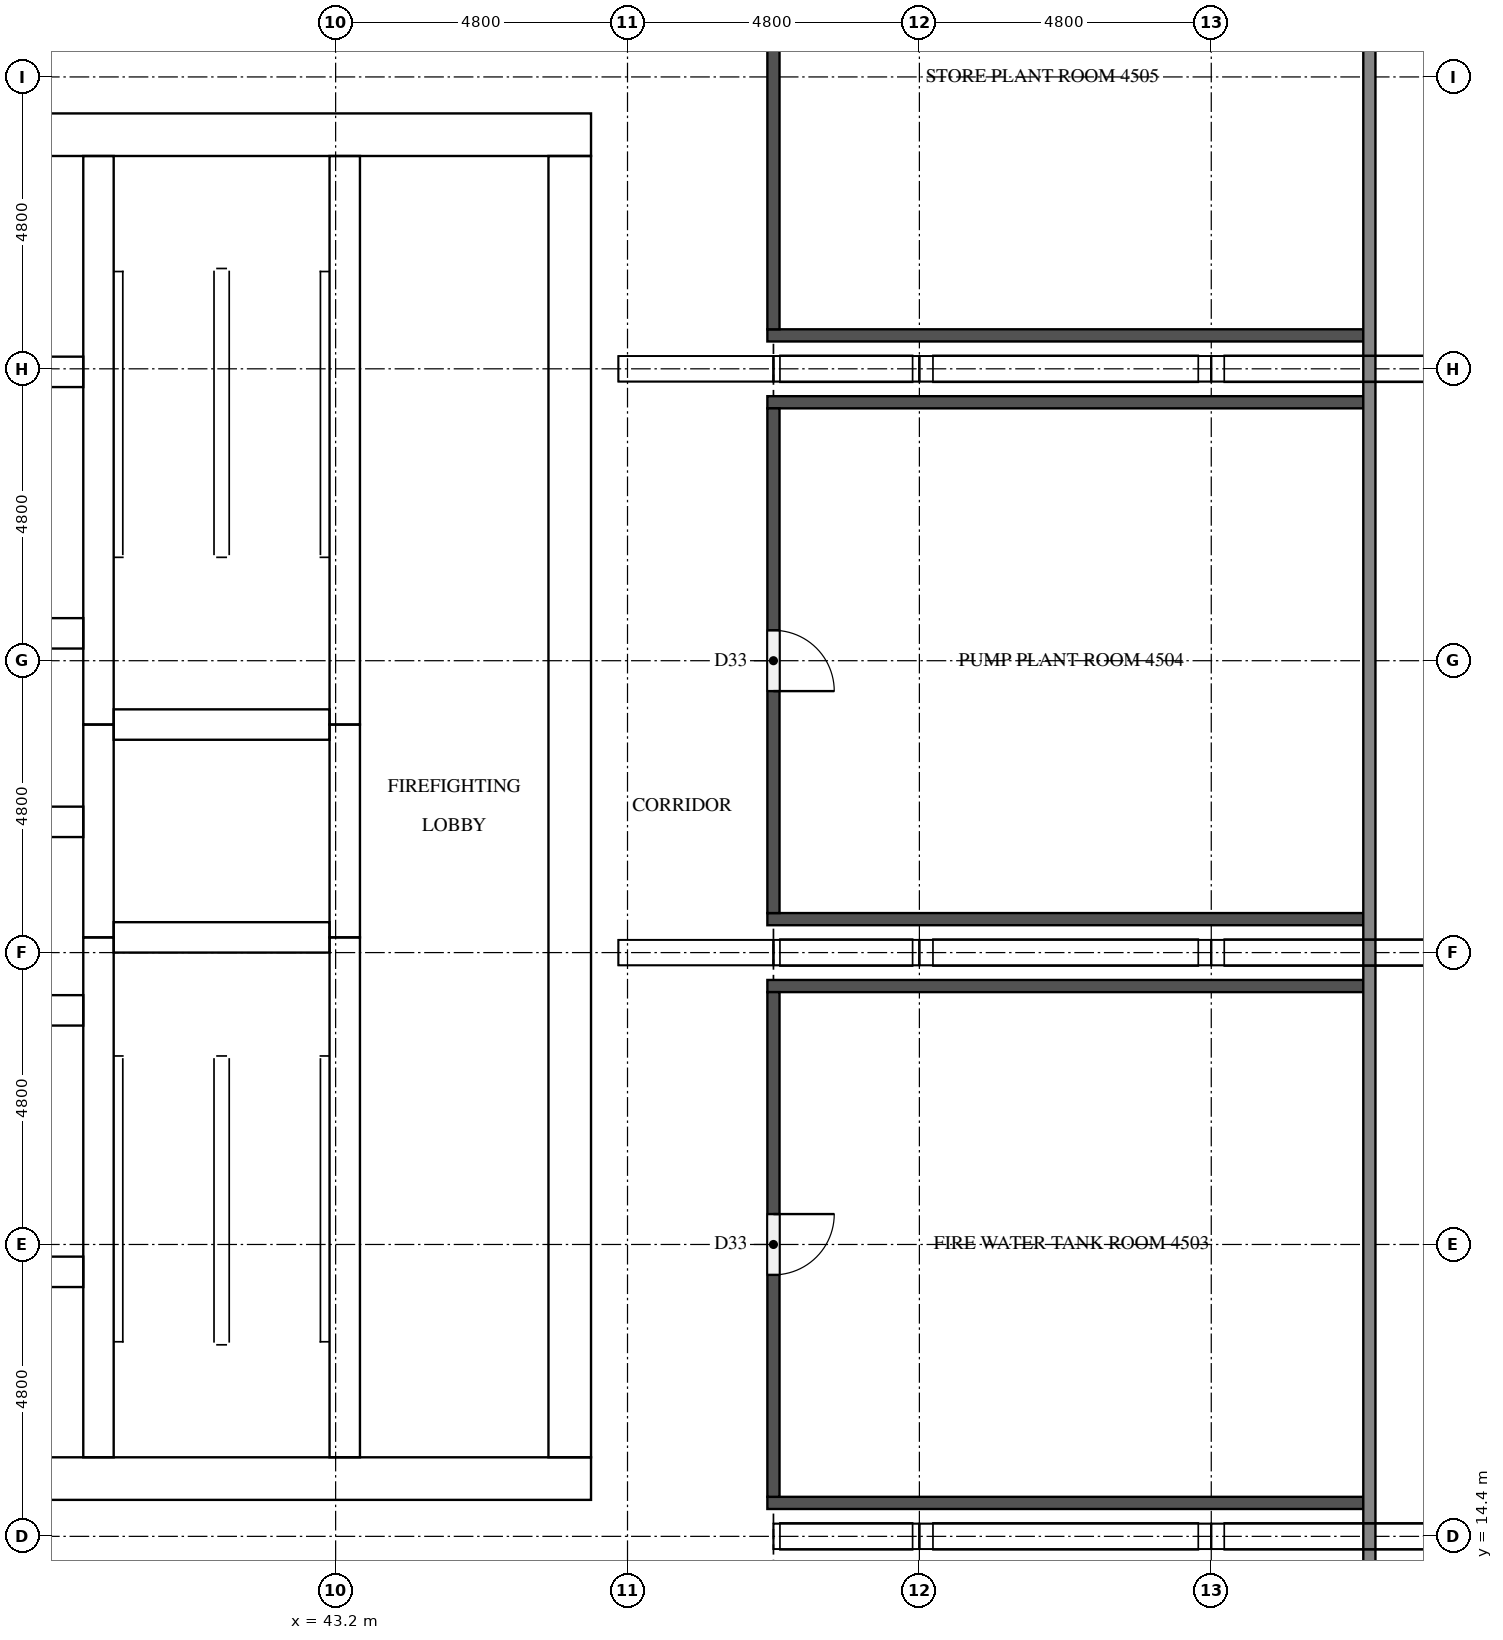
"""IFC4 building model, lengths in metres.
Left out: names, types, materials, properties, quantities, classifications, styles, units other than length and angle.
Written with IfcOpenShell. Run it as: python <this file> out.ifc"""

import sys

from ifc_helpers import new_model, si_unit, direction, frame, frame_2d, origin, place, context, subcontext, project, spatial, rectangle, extrude, element, fill, save


model = new_model("IFC4")
c1 = context("Model", 3, precision=1e-05, world=origin(), true_north=direction((0.0, 1.0)))
c2 = subcontext(c1, "Body", "Model", "MODEL_VIEW")
j1 = project(units=[si_unit("LENGTHUNIT", "METRE"), si_unit("PLANEANGLEUNIT", "RADIAN")], contexts=[c1])
p1 = place(None, origin())
s1 = spatial("IfcSite", under=j1, at=p1, CompositionType="ELEMENT")
p2 = place(p1, origin())
s2 = spatial("IfcBuilding", under=s1, at=p2, CompositionType="ELEMENT")
p3 = place(p2, frame((0.0, 0.0, 173.5)))
s3 = spatial("IfcBuildingStorey", under=s2, at=p3, CompositionType="ELEMENT", Elevation=173.5)
p4 = place(p3, frame((15.0, 15.35, 0.0), z_axis=(0.0, 0.0, 1.0), x_axis=(1.0, 0.0, 0.0)))
e1 = element("IfcWall", 1, at=p4, inside=s3, PredefinedType="SHEAR", context=c2, shape_type="SweptSolid", body=[
    extrude(rectangle(XDim=32.4, YDim=0.7, at=frame_2d((16.2, 0.0))), origin(), (0.0, 0.0, 1.0), 5.1),
])
p5 = place(p4, frame((15.3, 0.0, 0.0)))
e2 = element("IfcOpeningElement", 2, at=p5, cuts=e1, PredefinedType="OPENING", context=c2, shape_type="SweptSolid", body=[
    extrude(rectangle(XDim=1.8, YDim=2.1, at=frame_2d((0.9, 1.05))), frame((0.0, 0.36, 0.0), z_axis=(0.0, -1.0, 0.0), x_axis=(1.0, 0.0, 0.0)), (0.0, 0.0, 1.0), 0.72),
])
p6 = place(p3, frame((15.0, 37.45, 0.0), z_axis=(0.0, 0.0, 1.0), x_axis=(1.0, 0.0, 0.0)))
e3 = element("IfcWall", 3, at=p6, inside=s3, PredefinedType="SHEAR", context=c2, shape_type="SweptSolid", body=[
    extrude(rectangle(XDim=32.4, YDim=0.7, at=frame_2d((16.2, 0.0))), origin(), (0.0, 0.0, 1.0), 5.1),
])
p7 = place(p6, frame((15.3, 0.0, 0.0)))
e4 = element("IfcOpeningElement", 4, at=p7, cuts=e3, PredefinedType="OPENING", context=c2, shape_type="SweptSolid", body=[
    extrude(rectangle(XDim=1.8, YDim=2.1, at=frame_2d((0.9, 1.05))), frame((0.0, 0.36, 0.0), z_axis=(0.0, -1.0, 0.0), x_axis=(1.0, 0.0, 0.0)), (0.0, 0.0, 1.0), 0.72),
])
p8 = place(p6, frame((1.544, 0.0, 0.0)))
e5 = element("IfcOpeningElement", 5, at=p8, cuts=e3, PredefinedType="OPENING", context=c2, shape_type="SweptSolid", body=[
    extrude(rectangle(XDim=1.0, YDim=2.1, at=frame_2d((0.5, 1.05))), frame((0.0, 0.36, 0.0), z_axis=(0.0, -1.0, 0.0), x_axis=(1.0, 0.0, 0.0)), (0.0, 0.0, 1.0), 0.72),
])
p9 = place(p6, frame((5.219, 0.0, 0.0)))
e6 = element("IfcOpeningElement", 6, at=p9, cuts=e3, PredefinedType="OPENING", context=c2, shape_type="SweptSolid", body=[
    extrude(rectangle(XDim=1.0, YDim=2.1, at=frame_2d((0.5, 1.05))), frame((0.0, 0.36, 0.0), z_axis=(0.0, -1.0, 0.0), x_axis=(1.0, 0.0, 0.0)), (0.0, 0.0, 1.0), 0.72),
])
p10 = place(p3, frame((47.05, 15.7, 0.0), z_axis=(0.0, 0.0, 1.0), x_axis=(0.0, 1.0, 0.0)))
e7 = element("IfcWall", 7, at=p10, inside=s3, PredefinedType="SHEAR", context=c2, shape_type="SweptSolid", body=[
    extrude(rectangle(XDim=21.4, YDim=0.7, at=frame_2d((10.7, 0.0))), origin(), (0.0, 0.0, 1.0), 5.1),
])
p11 = place(p10, frame((10.4, 0.0, 0.0)))
e8 = element("IfcOpeningElement", 8, at=p11, cuts=e7, PredefinedType="OPENING", context=c2, shape_type="SweptSolid", body=[
    extrude(rectangle(XDim=1.2, YDim=2.1, at=frame_2d((0.6, 1.05))), frame((0.0, 0.36, 0.0), z_axis=(0.0, -1.0, 0.0), x_axis=(1.0, 0.0, 0.0)), (0.0, 0.0, 1.0), 0.72),
])
p12 = place(p3, frame((39.3, 15.7, 0.0), z_axis=(0.0, 0.0, 1.0), x_axis=(0.0, 1.0, 0.0)))
e9 = element("IfcWall", 9, at=p12, inside=s3, PredefinedType="SHEAR", context=c2, shape_type="SweptSolid", body=[
    extrude(rectangle(XDim=8.55, YDim=0.5, at=frame_2d((4.275, 0.0))), origin(), (0.0, 0.0, 1.0), 5.1),
])
p13 = place(p3, frame((39.3, 24.25, 0.0), z_axis=(0.0, 0.0, 1.0), x_axis=(0.0, 1.0, 0.0)))
e10 = element("IfcWall", 10, at=p13, inside=s3, PredefinedType="SHEAR", context=c2, shape_type="SweptSolid", body=[
    extrude(rectangle(XDim=3.5, YDim=0.5, at=frame_2d((1.75, 0.0))), origin(), (0.0, 0.0, 1.0), 5.1),
])
p14 = place(p3, frame((39.3, 27.75, 0.0), z_axis=(0.0, 0.0, 1.0), x_axis=(0.0, 1.0, 0.0)))
e11 = element("IfcWall", 11, at=p14, inside=s3, PredefinedType="SHEAR", context=c2, shape_type="SweptSolid", body=[
    extrude(rectangle(XDim=9.35, YDim=0.5, at=frame_2d((4.675, 0.0))), origin(), (0.0, 0.0, 1.0), 5.1),
])
p15 = place(p3, frame((43.35, 15.7, 0.0), z_axis=(0.0, 0.0, 1.0), x_axis=(0.0, 1.0, 0.0)))
e12 = element("IfcWall", 12, at=p15, inside=s3, PredefinedType="SHEAR", context=c2, shape_type="SweptSolid", body=[
    extrude(rectangle(XDim=8.55, YDim=0.5, at=frame_2d((4.275, 0.0))), origin(), (0.0, 0.0, 1.0), 5.1),
])
p16 = place(p15, frame((0.5, 0.0, 0.0)))
e13 = element("IfcOpeningElement", 13, at=p16, cuts=e12, PredefinedType="OPENING", context=c2, shape_type="SweptSolid", body=[
    extrude(rectangle(XDim=1.2, YDim=2.1, at=frame_2d((0.6, 1.05))), frame((0.0, 0.26, 0.0), z_axis=(0.0, -1.0, 0.0), x_axis=(1.0, 0.0, 0.0)), (0.0, 0.0, 1.0), 0.52),
])
p17 = place(p3, frame((43.35, 24.25, 0.0), z_axis=(0.0, 0.0, 1.0), x_axis=(0.0, 1.0, 0.0)))
e14 = element("IfcWall", 14, at=p17, inside=s3, PredefinedType="SHEAR", context=c2, shape_type="SweptSolid", body=[
    extrude(rectangle(XDim=3.5, YDim=0.5, at=frame_2d((1.75, 0.0))), origin(), (0.0, 0.0, 1.0), 5.1),
])
p18 = place(p17, frame((1.2, 0.0, 0.0)))
e15 = element("IfcOpeningElement", 15, at=p18, cuts=e14, PredefinedType="OPENING", context=c2, shape_type="SweptSolid", body=[
    extrude(rectangle(XDim=1.1, YDim=2.1, at=frame_2d((0.55, 1.05))), frame((0.0, 0.26, 0.0), z_axis=(0.0, -1.0, 0.0), x_axis=(1.0, 0.0, 0.0)), (0.0, 0.0, 1.0), 0.52),
])
p19 = place(p3, frame((43.35, 27.75, 0.0), z_axis=(0.0, 0.0, 1.0), x_axis=(0.0, 1.0, 0.0)))
e16 = element("IfcWall", 16, at=p19, inside=s3, PredefinedType="SHEAR", context=c2, shape_type="SweptSolid", body=[
    extrude(rectangle(XDim=9.35, YDim=0.5, at=frame_2d((4.675, 0.0))), origin(), (0.0, 0.0, 1.0), 5.1),
])
p20 = place(p19, frame((7.65, 0.0, 0.0)))
e17 = element("IfcOpeningElement", 17, at=p20, cuts=e16, PredefinedType="OPENING", context=c2, shape_type="SweptSolid", body=[
    extrude(rectangle(XDim=1.2, YDim=2.1, at=frame_2d((0.6, 1.05))), frame((0.0, 0.26, 0.0), z_axis=(0.0, -1.0, 0.0), x_axis=(1.0, 0.0, 0.0)), (0.0, 0.0, 1.0), 0.52),
])
for number, where, z_axis, x_axis in (
    (18, (39.55, 24.25, 0.0), (0.0, 0.0, 1.0), (1.0, 0.0, 0.0)),
    (19, (39.55, 27.75, 0.0), (0.0, 0.0, 1.0), (1.0, 0.0, 0.0)),
):
    element("IfcWall", number, at=place(p3, frame(where, z_axis=z_axis, x_axis=x_axis)), inside=s3, PredefinedType="SHEAR", context=c2, shape_type="SweptSolid", body=[
        extrude(rectangle(XDim=3.55, YDim=0.5, at=frame_2d((1.775, 0.0))), origin(), (0.0, 0.0, 1.0), 5.1),
    ])
p21 = place(p3, frame((33.45, 18.75, 0.0), z_axis=(0.0, 0.0, 1.0), x_axis=(1.0, 0.0, 0.0)))
e20 = element("IfcWall", 20, at=p21, inside=s3, PredefinedType="SHEAR", context=c2, shape_type="SweptSolid", body=[
    extrude(rectangle(XDim=5.6, YDim=0.5, at=frame_2d((2.8, 0.0))), origin(), (0.0, 0.0, 1.0), 5.1),
])
p22 = place(p21, frame((2.55, 0.0, 0.0)))
e21 = element("IfcOpeningElement", 21, at=p22, cuts=e20, PredefinedType="OPENING", context=c2, shape_type="SweptSolid", body=[
    extrude(rectangle(XDim=1.0, YDim=2.1, at=frame_2d((0.5, 1.05))), frame((0.0, 0.26, 0.0), z_axis=(0.0, -1.0, 0.0), x_axis=(1.0, 0.0, 0.0)), (0.0, 0.0, 1.0), 0.52),
])
p23 = place(p3, frame((23.35, 23.05, 0.0), z_axis=(0.0, 0.0, 1.0), x_axis=(1.0, 0.0, 0.0)))
e22 = element("IfcWall", 22, at=p23, inside=s3, PredefinedType="SHEAR", context=c2, shape_type="SweptSolid", body=[
    extrude(rectangle(XDim=15.7, YDim=0.5, at=frame_2d((7.85, 0.0))), origin(), (0.0, 0.0, 1.0), 5.1),
])
p24 = place(p23, frame((2.05, 0.0, 0.0)))
e23 = element("IfcOpeningElement", 23, at=p24, cuts=e22, PredefinedType="OPENING", context=c2, shape_type="SweptSolid", body=[
    extrude(rectangle(XDim=1.0, YDim=2.1, at=frame_2d((0.5, 1.05))), frame((0.0, 0.26, 0.0), z_axis=(0.0, -1.0, 0.0), x_axis=(1.0, 0.0, 0.0)), (0.0, 0.0, 1.0), 0.52),
])
p25 = place(p23, frame((12.65, 0.0, 0.0)))
e24 = element("IfcOpeningElement", 24, at=p25, cuts=e22, PredefinedType="OPENING", context=c2, shape_type="SweptSolid", body=[
    extrude(rectangle(XDim=1.0, YDim=2.1, at=frame_2d((0.5, 1.05))), frame((0.0, 0.26, 0.0), z_axis=(0.0, -1.0, 0.0), x_axis=(1.0, 0.0, 0.0)), (0.0, 0.0, 1.0), 0.52),
])
p26 = place(p3, frame((23.35, 26.15, 0.0), z_axis=(0.0, 0.0, 1.0), x_axis=(1.0, 0.0, 0.0)))
e25 = element("IfcWall", 25, at=p26, inside=s3, PredefinedType="SHEAR", context=c2, shape_type="SweptSolid", body=[
    extrude(rectangle(XDim=15.7, YDim=0.5, at=frame_2d((7.85, 0.0))), origin(), (0.0, 0.0, 1.0), 5.1),
])
p27 = place(p3, frame((23.35, 29.25, 0.0), z_axis=(0.0, 0.0, 1.0), x_axis=(1.0, 0.0, 0.0)))
e26 = element("IfcWall", 26, at=p27, inside=s3, PredefinedType="SHEAR", context=c2, shape_type="SweptSolid", body=[
    extrude(rectangle(XDim=15.7, YDim=0.5, at=frame_2d((7.85, 0.0))), origin(), (0.0, 0.0, 1.0), 5.1),
])
p28 = place(p27, frame((0.675, 0.0, 0.0)))
e27 = element("IfcOpeningElement", 27, at=p28, cuts=e26, PredefinedType="OPENING", context=c2, shape_type="SweptSolid", body=[
    extrude(rectangle(XDim=1.1, YDim=2.1, at=frame_2d((0.55, 1.05))), frame((0.0, 0.26, 0.0), z_axis=(0.0, -1.0, 0.0), x_axis=(1.0, 0.0, 0.0)), (0.0, 0.0, 1.0), 0.52),
])
p29 = place(p27, frame((3.325, 0.0, 0.0)))
e28 = element("IfcOpeningElement", 28, at=p29, cuts=e26, PredefinedType="OPENING", context=c2, shape_type="SweptSolid", body=[
    extrude(rectangle(XDim=1.1, YDim=2.1, at=frame_2d((0.55, 1.05))), frame((0.0, 0.26, 0.0), z_axis=(0.0, -1.0, 0.0), x_axis=(1.0, 0.0, 0.0)), (0.0, 0.0, 1.0), 0.52),
])
p30 = place(p27, frame((5.975, 0.0, 0.0)))
e29 = element("IfcOpeningElement", 29, at=p30, cuts=e26, PredefinedType="OPENING", context=c2, shape_type="SweptSolid", body=[
    extrude(rectangle(XDim=1.1, YDim=2.1, at=frame_2d((0.55, 1.05))), frame((0.0, 0.26, 0.0), z_axis=(0.0, -1.0, 0.0), x_axis=(1.0, 0.0, 0.0)), (0.0, 0.0, 1.0), 0.52),
])
p31 = place(p27, frame((8.625, 0.0, 0.0)))
e30 = element("IfcOpeningElement", 30, at=p31, cuts=e26, PredefinedType="OPENING", context=c2, shape_type="SweptSolid", body=[
    extrude(rectangle(XDim=1.1, YDim=2.1, at=frame_2d((0.55, 1.05))), frame((0.0, 0.26, 0.0), z_axis=(0.0, -1.0, 0.0), x_axis=(1.0, 0.0, 0.0)), (0.0, 0.0, 1.0), 0.52),
])
p32 = place(p27, frame((11.275, 0.0, 0.0)))
e31 = element("IfcOpeningElement", 31, at=p32, cuts=e26, PredefinedType="OPENING", context=c2, shape_type="SweptSolid", body=[
    extrude(rectangle(XDim=1.1, YDim=2.1, at=frame_2d((0.55, 1.05))), frame((0.0, 0.26, 0.0), z_axis=(0.0, -1.0, 0.0), x_axis=(1.0, 0.0, 0.0)), (0.0, 0.0, 1.0), 0.52),
])
p33 = place(p27, frame((13.925, 0.0, 0.0)))
e32 = element("IfcOpeningElement", 32, at=p33, cuts=e26, PredefinedType="OPENING", context=c2, shape_type="SweptSolid", body=[
    extrude(rectangle(XDim=1.1, YDim=2.1, at=frame_2d((0.55, 1.05))), frame((0.0, 0.26, 0.0), z_axis=(0.0, -1.0, 0.0), x_axis=(1.0, 0.0, 0.0)), (0.0, 0.0, 1.0), 0.52),
])
p34 = place(p3, frame((33.45, 33.55, 0.0), z_axis=(0.0, 0.0, 1.0), x_axis=(1.0, 0.0, 0.0)))
e33 = element("IfcWall", 33, at=p34, inside=s3, PredefinedType="SHEAR", context=c2, shape_type="SweptSolid", body=[
    extrude(rectangle(XDim=5.6, YDim=0.5, at=frame_2d((2.8, 0.0))), origin(), (0.0, 0.0, 1.0), 5.1),
])
p35 = place(p34, frame((2.55, 0.0, 0.0)))
e34 = element("IfcOpeningElement", 34, at=p35, cuts=e33, PredefinedType="OPENING", context=c2, shape_type="SweptSolid", body=[
    extrude(rectangle(XDim=1.0, YDim=2.1, at=frame_2d((0.5, 1.05))), frame((0.0, 0.26, 0.0), z_axis=(0.0, -1.0, 0.0), x_axis=(1.0, 0.0, 0.0)), (0.0, 0.0, 1.0), 0.52),
])
for number, where, z_axis, x_axis in (
    (35, (50.3, 14.95, 0.0), (0.0, 0.0, 1.0), (1.0, 0.0, 0.0)),
    (36, (50.3, 23.45, 0.0), (0.0, 0.0, 1.0), (1.0, 0.0, 0.0)),
    (37, (50.3, 24.55, 0.0), (0.0, 0.0, 1.0), (1.0, 0.0, 0.0)),
    (38, (50.3, 33.05, 0.0), (0.0, 0.0, 1.0), (1.0, 0.0, 0.0)),
    (39, (50.3, 34.15, 0.0), (0.0, 0.0, 1.0), (1.0, 0.0, 0.0)),
):
    element("IfcWall", number, at=place(p3, frame(where, z_axis=z_axis, x_axis=x_axis)), inside=s3, PredefinedType="PARTITIONING", context=c2, shape_type="SweptSolid", body=[
        extrude(rectangle(XDim=9.8, YDim=0.2, at=frame_2d((4.9, 0.0))), origin(), (0.0, 0.0, 1.0), 5.1),
    ])
p36 = place(p3, frame((50.4, 23.35, 0.0), z_axis=(0.0, 0.0, 1.0), x_axis=(0.0, -1.0, 0.0)))
e40 = element("IfcWall", 40, at=p36, inside=s3, PredefinedType="PARTITIONING", context=c2, shape_type="SweptSolid", body=[
    extrude(rectangle(XDim=8.3, YDim=0.2, at=frame_2d((4.15, 0.0))), origin(), (0.0, 0.0, 1.0), 5.1),
])
p37 = place(p36, frame((3.65, 0.0, 0.0)))
e41 = element("IfcOpeningElement", 41, at=p37, cuts=e40, PredefinedType="OPENING", context=c2, shape_type="SweptSolid", body=[
    extrude(rectangle(XDim=1.0, YDim=2.1, at=frame_2d((0.5, 1.05))), frame((0.0, 0.11, 0.0), z_axis=(0.0, -1.0, 0.0), x_axis=(1.0, 0.0, 0.0)), (0.0, 0.0, 1.0), 0.22),
])
p38 = place(p3, frame((50.4, 32.95, 0.0), z_axis=(0.0, 0.0, 1.0), x_axis=(0.0, -1.0, 0.0)))
e42 = element("IfcWall", 42, at=p38, inside=s3, PredefinedType="PARTITIONING", context=c2, shape_type="SweptSolid", body=[
    extrude(rectangle(XDim=8.3, YDim=0.2, at=frame_2d((4.15, 0.0))), origin(), (0.0, 0.0, 1.0), 5.1),
])
p39 = place(p38, frame((3.65, 0.0, 0.0)))
e43 = element("IfcOpeningElement", 43, at=p39, cuts=e42, PredefinedType="OPENING", context=c2, shape_type="SweptSolid", body=[
    extrude(rectangle(XDim=1.0, YDim=2.1, at=frame_2d((0.5, 1.05))), frame((0.0, 0.11, 0.0), z_axis=(0.0, -1.0, 0.0), x_axis=(1.0, 0.0, 0.0)), (0.0, 0.0, 1.0), 0.22),
])
p40 = place(p3, frame((50.4, 34.25, 0.0), z_axis=(0.0, 0.0, 1.0), x_axis=(0.0, 1.0, 0.0)))
e44 = element("IfcWall", 44, at=p40, inside=s3, PredefinedType="PARTITIONING", context=c2, shape_type="SweptSolid", body=[
    extrude(rectangle(XDim=6.45, YDim=0.2, at=frame_2d((3.225, 0.0))), origin(), (0.0, 0.0, 1.0), 5.1),
])
p41 = place(p18, origin())
e45 = element("IfcDoor", 45, at=p41, inside=s3, OperationType="DOUBLE_DOOR_SLIDING", PredefinedType="DOOR", context=c2, shape_type="SweptSolid", body=[
    extrude(rectangle(XDim=1.1, YDim=2.1, at=frame_2d((0.55, 1.05))), frame((0.0, 0.025, 0.0), z_axis=(0.0, -1.0, 0.0), x_axis=(1.0, 0.0, 0.0)), (0.0, 0.0, 1.0), 0.05),
])
fill(e15, e45)
p42 = place(p16, origin())
e46 = element("IfcDoor", 46, at=p42, inside=s3, OperationType="SINGLE_SWING_RIGHT", PredefinedType="DOOR", context=c2, shape_type="SweptSolid", body=[
    extrude(rectangle(XDim=1.2, YDim=2.1, at=frame_2d((0.6, 1.05))), frame((0.0, 0.025, 0.0), z_axis=(0.0, -1.0, 0.0), x_axis=(1.0, 0.0, 0.0)), (0.0, 0.0, 1.0), 0.05),
])
fill(e13, e46)
p43 = place(p20, origin())
e47 = element("IfcDoor", 47, at=p43, inside=s3, OperationType="SINGLE_SWING_LEFT", PredefinedType="DOOR", context=c2, shape_type="SweptSolid", body=[
    extrude(rectangle(XDim=1.2, YDim=2.1, at=frame_2d((0.6, 1.05))), frame((0.0, 0.025, 0.0), z_axis=(0.0, -1.0, 0.0), x_axis=(1.0, 0.0, 0.0)), (0.0, 0.0, 1.0), 0.05),
])
fill(e17, e47)
p44 = place(p11, origin())
e48 = element("IfcDoor", 48, at=p44, inside=s3, OperationType="SINGLE_SWING_LEFT", PredefinedType="DOOR", context=c2, shape_type="SweptSolid", body=[
    extrude(rectangle(XDim=1.2, YDim=2.1, at=frame_2d((0.6, 1.05))), frame((0.0, 0.025, 0.0), z_axis=(0.0, -1.0, 0.0), x_axis=(1.0, 0.0, 0.0)), (0.0, 0.0, 1.0), 0.05),
])
fill(e8, e48)
p45 = place(p37, origin())
e49 = element("IfcDoor", 49, at=p45, inside=s3, OperationType="SINGLE_SWING_LEFT", PredefinedType="DOOR", context=c2, shape_type="SweptSolid", body=[
    extrude(rectangle(XDim=1.0, YDim=2.1, at=frame_2d((0.5, 1.05))), frame((0.0, 0.025, 0.0), z_axis=(0.0, -1.0, 0.0), x_axis=(1.0, 0.0, 0.0)), (0.0, 0.0, 1.0), 0.05),
])
fill(e41, e49)
p46 = place(p39, origin())
e50 = element("IfcDoor", 50, at=p46, inside=s3, OperationType="SINGLE_SWING_RIGHT", PredefinedType="DOOR", context=c2, shape_type="SweptSolid", body=[
    extrude(rectangle(XDim=1.0, YDim=2.1, at=frame_2d((0.5, 1.05))), frame((0.0, 0.025, 0.0), z_axis=(0.0, -1.0, 0.0), x_axis=(1.0, 0.0, 0.0)), (0.0, 0.0, 1.0), 0.05),
])
fill(e43, e50)
save(model, sys.argv[1])
